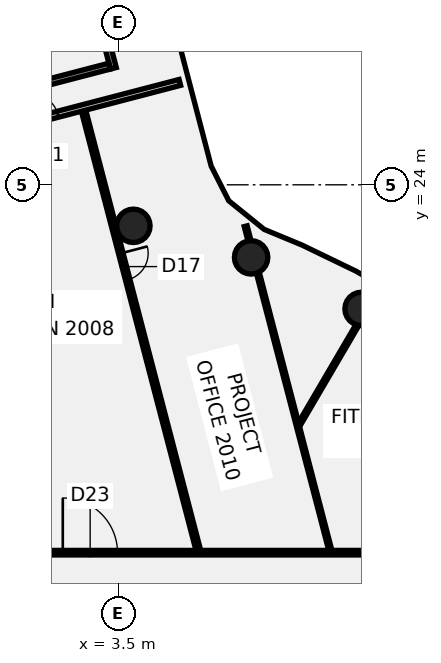
"""IFC4 building model, lengths in metres.
Left out: names, types, materials, properties, quantities, classifications, styles, units other than length and angle.
Written with IfcOpenShell. Run it as: python <this file> out.ifc"""

import sys

from ifc_helpers import new_model, si_unit, direction, frame, frame_2d, origin, origin_2d, place, context, subcontext, project, spatial, rectangle, circle, extrude, element, fill, save


model = new_model("IFC4")
c1 = context("Model", 3, precision=1e-05, world=origin(), true_north=direction((0.0, 1.0)))
c2 = subcontext(c1, "Body", "Model", "MODEL_VIEW")
j1 = project(units=[si_unit("LENGTHUNIT", "METRE"), si_unit("PLANEANGLEUNIT", "RADIAN")], contexts=[c1])
p1 = place(None, origin())
s1 = spatial("IfcSite", under=j1, at=p1, CompositionType="ELEMENT")
p2 = place(p1, origin())
s2 = spatial("IfcBuilding", under=s1, at=p2, CompositionType="ELEMENT")
p3 = place(p2, frame((0.0, 0.0, 87.25)))
s3 = spatial("IfcBuildingStorey", under=s2, at=p3, CompositionType="ELEMENT", Elevation=87.25)
for number, where, z_axis, x_axis in (
    (1, (11.5, 19.919, -0.14), (0.0, 0.0, 1.0), (1.0, 0.0, 0.0)),
    (2, (7.866, 21.613, -0.14), (0.0, 0.0, 1.0), (1.0, 0.0, 0.0)),
    (3, (3.994, 22.651, -0.14), (0.0, 0.0, 1.0), (1.0, 0.0, 0.0)),
):
    element("IfcColumn", number, at=place(p3, frame(where, z_axis=z_axis, x_axis=x_axis)), inside=s3, PredefinedType="COLUMN", context=c2, shape_type="SweptSolid", body=[
        extrude(circle(Radius=0.55, at=origin_2d()), origin(), (0.0, 0.0, 1.0), 3.75),
    ])
p4 = place(p3, frame((2.356, 26.433, 0.0), z_axis=(0.0, 0.0, 1.0), x_axis=(0.252565578954, -0.967579778792, 0.0)))
e4 = element("IfcWall", 4, at=p4, inside=s3, PredefinedType="PARTITIONING", context=c2, shape_type="SweptSolid", body=[
    extrude(rectangle(XDim=14.94, YDim=0.15, at=frame_2d((7.47, 0.0))), origin(), (0.0, 0.0, 1.0), 3.01),
])
p5 = place(p4, frame((4.845, 0.0, 0.0)))
e5 = element("IfcOpeningElement", 5, at=p5, cuts=e4, PredefinedType="OPENING", context=c2, shape_type="SweptSolid", body=[
    extrude(rectangle(XDim=0.9, YDim=2.1, at=frame_2d((0.45, 1.05))), frame((0.0, 0.085, 0.0), z_axis=(0.0, -1.0, 0.0), x_axis=(1.0, 0.0, 0.0)), (0.0, 0.0, 1.0), 0.17),
])
p6 = place(p3, frame((7.688, 22.638, 0.0), z_axis=(0.0, 0.0, 1.0), x_axis=(0.252843213146, -0.967507265898, 0.0)))
e6 = element("IfcWall", 6, at=p6, inside=s3, PredefinedType="PARTITIONING", context=c2, shape_type="SweptSolid", body=[
    extrude(rectangle(XDim=0.495, YDim=0.1, at=frame_2d((0.248, 0.0))), origin(), (0.0, 0.0, 1.0), 3.01),
])
p7 = place(p3, frame((8.087, 21.112, 0.0), z_axis=(0.0, 0.0, 1.0), x_axis=(0.252552298943, -0.967583245152, 0.0)))
e7 = element("IfcWall", 7, at=p7, inside=s3, PredefinedType="PARTITIONING", context=c2, shape_type="SweptSolid", body=[
    extrude(rectangle(XDim=9.45, YDim=0.1, at=frame_2d((4.725, 0.0))), origin(), (0.0, 0.0, 1.0), 3.01),
])
p8 = place(p3, frame((-17.065, 11.9, 0.0), z_axis=(0.0, 0.0, 1.0), x_axis=(1.0, 0.0, 0.0)))
e8 = element("IfcWall", 8, at=p8, inside=s3, PredefinedType="PARTITIONING", context=c2, shape_type="SweptSolid", body=[
    extrude(rectangle(XDim=34.165, YDim=0.15, at=frame_2d((17.083, 0.0))), origin(), (0.0, 0.0, 1.0), 3.01),
])
p9 = place(p8, frame((18.737, 0.0, 0.0)))
e9 = element("IfcOpeningElement", 9, at=p9, cuts=e8, PredefinedType="OPENING", context=c2, shape_type="SweptSolid", body=[
    extrude(rectangle(XDim=1.8, YDim=2.1, at=frame_2d((0.9, 1.05))), frame((0.0, 0.085, 0.0), z_axis=(0.0, -1.0, 0.0), x_axis=(1.0, 0.0, 0.0)), (0.0, 0.0, 1.0), 0.17),
])
p10 = place(p8, frame((30.556, 0.0, 0.0)))
e10 = element("IfcOpeningElement", 10, at=p10, cuts=e8, PredefinedType="OPENING", context=c2, shape_type="SweptSolid", body=[
    extrude(rectangle(XDim=1.8, YDim=2.1, at=frame_2d((0.9, 1.05))), frame((0.0, 0.085, 0.0), z_axis=(0.0, -1.0, 0.0), x_axis=(1.0, 0.0, 0.0)), (0.0, 0.0, 1.0), 0.17),
])
p11 = place(p8, frame((5.065, 0.0, 0.0)))
e11 = element("IfcOpeningElement", 11, at=p11, cuts=e8, PredefinedType="OPENING", context=c2, shape_type="SweptSolid", body=[
    extrude(rectangle(XDim=1.8, YDim=2.1, at=frame_2d((0.9, 1.05))), frame((0.0, 0.085, 0.0), z_axis=(0.0, -1.0, 0.0), x_axis=(1.0, 0.0, 0.0)), (0.0, 0.0, 1.0), 0.17),
])
p12 = place(p3, frame((-7.878, 23.871, 0.0), z_axis=(0.0, 0.0, 1.0), x_axis=(0.967613528242, 0.252436249306, 0.0)))
e12 = element("IfcWall", 12, at=p12, inside=s3, PredefinedType="PARTITIONING", context=c2, shape_type="SweptSolid", body=[
    extrude(rectangle(XDim=13.849, YDim=0.2, at=frame_2d((6.925, 0.0))), origin(), (0.0, 0.0, 1.0), 3.01),
])
p13 = place(p12, frame((6.55, 0.0, 0.0)))
e13 = element("IfcOpeningElement", 13, at=p13, cuts=e12, PredefinedType="OPENING", context=c2, shape_type="SweptSolid", body=[
    extrude(rectangle(XDim=1.4, YDim=2.1, at=frame_2d((0.7, 1.05))), frame((0.0, 0.11, 0.0), z_axis=(0.0, -1.0, 0.0), x_axis=(1.0, 0.0, 0.0)), (0.0, 0.0, 1.0), 0.22),
])
p14 = place(p12, frame((8.8, 0.0, 0.0)))
e14 = element("IfcOpeningElement", 14, at=p14, cuts=e12, PredefinedType="OPENING", context=c2, shape_type="SweptSolid", body=[
    extrude(rectangle(XDim=0.9, YDim=2.1, at=frame_2d((0.45, 1.05))), frame((0.0, 0.11, 0.0), z_axis=(0.0, -1.0, 0.0), x_axis=(1.0, 0.0, 0.0)), (0.0, 0.0, 1.0), 0.22),
])
p15 = place(p3, frame((9.457, 16.137, 0.0), z_axis=(0.0, 0.0, 1.0), x_axis=(0.505643154542, 0.862742719624, 0.0)))
e15 = element("IfcWall", 15, at=p15, inside=s3, PredefinedType="PARTITIONING", context=c2, shape_type="SweptSolid", body=[
    extrude(rectangle(XDim=3.775, YDim=0.1, at=frame_2d((1.888, 0.0))), origin(), (0.0, 0.0, 1.0), 3.01),
])
p16 = place(p3, frame((3.335, 27.831, -0.14), z_axis=(0.0, 0.0, 1.0), x_axis=(-0.252519796493, 0.967591728147, 0.0)))
e16 = element("IfcWall", 16, at=p16, inside=s3, PredefinedType="SHEAR", context=c2, shape_type="SweptSolid", body=[
    extrude(rectangle(XDim=6.7, YDim=0.2, at=frame_2d((3.35, 0.0))), origin(), (0.0, 0.0, 1.0), 3.15),
])
p17 = place(p3, frame((3.213, 27.903, -0.14), z_axis=(0.0, 0.0, 1.0), x_axis=(-0.967586476706, -0.252539917828, 0.0)))
e17 = element("IfcWall", 17, at=p17, inside=s3, PredefinedType="SHEAR", context=c2, shape_type="SweptSolid", body=[
    extrude(rectangle(XDim=3.2, YDim=0.2, at=frame_2d((1.6, 0.0))), origin(), (0.0, 0.0, 1.0), 3.15),
])
p18 = place(p5, origin())
e18 = element("IfcDoor", 18, at=p18, inside=s3, OperationType="SINGLE_SWING_RIGHT", PredefinedType="DOOR", context=c2, shape_type="SweptSolid", body=[
    extrude(rectangle(XDim=0.9, YDim=2.1, at=frame_2d((0.45, 1.05))), frame((0.0, 0.025, 0.0), z_axis=(0.0, -1.0, 0.0), x_axis=(1.0, 0.0, 0.0)), (0.0, 0.0, 1.0), 0.05),
])
fill(e5, e18)
p19 = place(p9, frame((1.8, 0.0, 0.0), z_axis=(0.0, 0.0, 1.0), x_axis=(-1.0, 0.0, 0.0)))
e19 = element("IfcDoor", 19, at=p19, inside=s3, OperationType="DOUBLE_DOOR_SINGLE_SWING", PredefinedType="DOOR", context=c2, shape_type="SweptSolid", body=[
    extrude(rectangle(XDim=1.8, YDim=2.1, at=frame_2d((0.9, 1.05))), frame((0.0, 0.025, 0.0), z_axis=(0.0, -1.0, 0.0), x_axis=(1.0, 0.0, 0.0)), (0.0, 0.0, 1.0), 0.05),
])
fill(e9, e19)
p20 = place(p14, origin())
e20 = element("IfcDoor", 20, at=p20, inside=s3, OperationType="SINGLE_SWING_LEFT", PredefinedType="DOOR", context=c2, shape_type="SweptSolid", body=[
    extrude(rectangle(XDim=0.9, YDim=2.1, at=frame_2d((0.45, 1.05))), frame((0.0, 0.025, 0.0), z_axis=(0.0, -1.0, 0.0), x_axis=(1.0, 0.0, 0.0)), (0.0, 0.0, 1.0), 0.05),
])
fill(e14, e20)
save(model, sys.argv[1])
